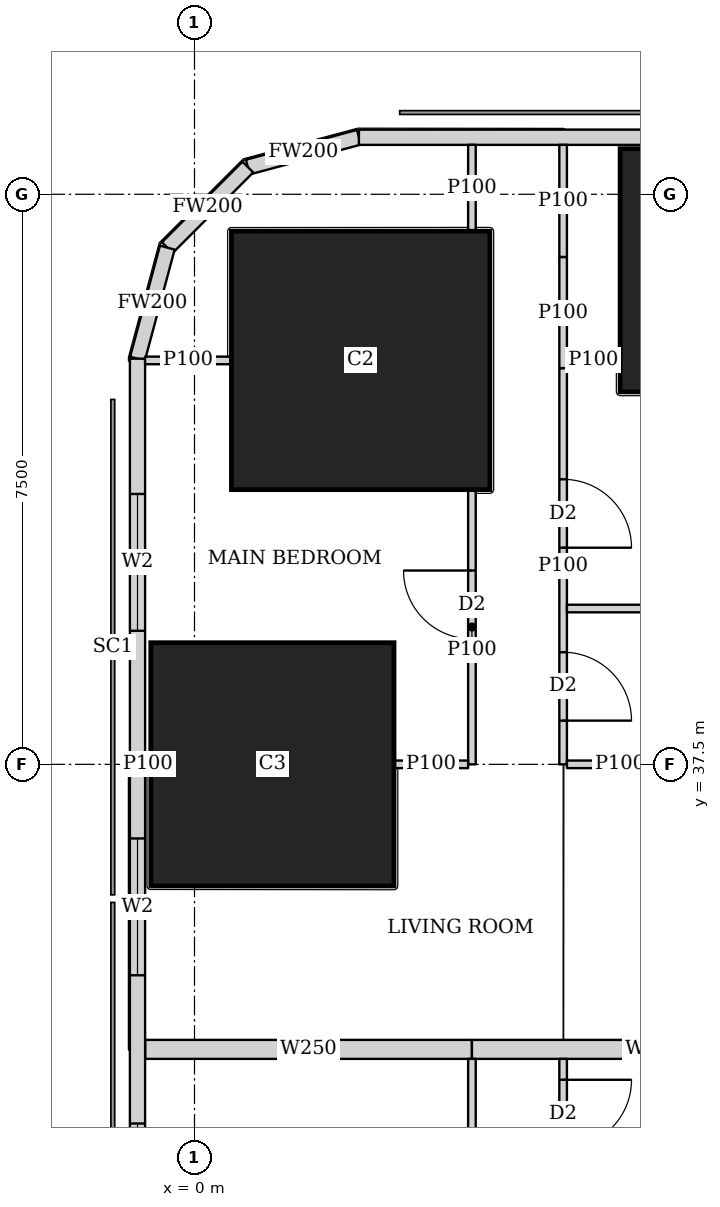
"""IFC4 building model, lengths in metres.
Left out: names, types, materials, properties, quantities, classifications, styles, units other than length and angle.
Written with IfcOpenShell. Run it as: python <this file> out.ifc"""

import sys

from ifc_helpers import new_model, si_unit, direction, frame, frame_2d, origin, origin_2d, place, context, subcontext, project, spatial, rectangle, extrude, element, fill, save


model = new_model("IFC4")
c1 = context("Model", 3, precision=1e-05, world=origin(), true_north=direction((0.0, 1.0)))
c2 = subcontext(c1, "Body", "Model", "MODEL_VIEW")
j1 = project(units=[si_unit("LENGTHUNIT", "METRE"), si_unit("PLANEANGLEUNIT", "RADIAN")], contexts=[c1])
p1 = place(None, origin())
s1 = spatial("IfcSite", under=j1, at=p1, CompositionType="ELEMENT")
p2 = place(p1, origin())
s2 = spatial("IfcBuilding", under=s1, at=p2, CompositionType="ELEMENT")
p3 = place(p2, frame((0.0, 0.0, 20.0)))
s3 = spatial("IfcBuildingStorey", under=s2, at=p3, CompositionType="ELEMENT", Elevation=20.0)
p4 = place(p3, frame((1.025, 37.5, -0.3), z_axis=(0.0, 0.0, 1.0), x_axis=(1.0, 0.0, 0.0)))
e1 = element("IfcColumn", 1, at=p4, inside=s3, PredefinedType="COLUMN", context=c2, shape_type="SweptSolid", body=[
    extrude(rectangle(XDim=3.2, YDim=3.2, at=origin_2d()), origin(), (0.0, 0.0, 1.0), 4.05),
])
p5 = place(p3, frame((2.186, 42.814, 0.0), z_axis=(0.0, 0.0, 1.0), x_axis=(1.0, 0.0, 0.0)))
e2 = element("IfcColumn", 2, at=p5, inside=s3, PredefinedType="COLUMN", context=c2, shape_type="SweptSolid", body=[
    extrude(rectangle(XDim=3.4, YDim=3.4, at=origin_2d()), origin(), (0.0, 0.0, 1.0), 3.75),
])
p6 = place(p3, frame((7.2, 44.0, -0.3), z_axis=(0.0, 0.0, 1.0), x_axis=(1.0, 0.0, 0.0)))
e3 = element("IfcColumn", 3, at=p6, inside=s3, PredefinedType="COLUMN", context=c2, shape_type="SweptSolid", body=[
    extrude(rectangle(XDim=3.2, YDim=3.2, at=origin_2d()), origin(), (0.0, 0.0, 1.0), 4.05),
])
p7 = place(p3, frame((40.106, 45.75, 0.0), z_axis=(0.0, 0.0, 1.0), x_axis=(-1.0, 0.0, 0.0)))
e4 = element("IfcWall", 4, at=p7, inside=s3, PredefinedType="SOLIDWALL", context=c2, shape_type="SweptSolid", body=[
    extrude(rectangle(XDim=37.943, YDim=0.2, at=frame_2d((18.971, 0.0))), origin(), (0.0, 0.0, 1.0), 3.5),
])
p8 = place(p7, frame((8.606, 0.0, 0.9)))
e5 = element("IfcOpeningElement", 5, at=p8, cuts=e4, PredefinedType="OPENING", context=c2, shape_type="SweptSolid", body=[
    extrude(rectangle(XDim=1.8, YDim=1.5, at=frame_2d((0.9, 0.75))), frame((0.0, 0.11, 0.0), z_axis=(0.0, -1.0, 0.0), x_axis=(1.0, 0.0, 0.0)), (0.0, 0.0, 1.0), 0.22),
])
p9 = place(p7, frame((12.206, 0.0, 0.9)))
e6 = element("IfcOpeningElement", 6, at=p9, cuts=e4, PredefinedType="OPENING", context=c2, shape_type="SweptSolid", body=[
    extrude(rectangle(XDim=1.8, YDim=1.5, at=frame_2d((0.9, 0.75))), frame((0.0, 0.11, 0.0), z_axis=(0.0, -1.0, 0.0), x_axis=(1.0, 0.0, 0.0)), (0.0, 0.0, 1.0), 0.22),
])
p10 = place(p7, frame((15.806, 0.0, 0.9)))
e7 = element("IfcOpeningElement", 7, at=p10, cuts=e4, PredefinedType="OPENING", context=c2, shape_type="SweptSolid", body=[
    extrude(rectangle(XDim=1.8, YDim=1.5, at=frame_2d((0.9, 0.75))), frame((0.0, 0.11, 0.0), z_axis=(0.0, -1.0, 0.0), x_axis=(1.0, 0.0, 0.0)), (0.0, 0.0, 1.0), 0.22),
])
p11 = place(p7, frame((19.406, 0.0, 0.9)))
e8 = element("IfcOpeningElement", 8, at=p11, cuts=e4, PredefinedType="OPENING", context=c2, shape_type="SweptSolid", body=[
    extrude(rectangle(XDim=1.8, YDim=1.5, at=frame_2d((0.9, 0.75))), frame((0.0, 0.11, 0.0), z_axis=(0.0, -1.0, 0.0), x_axis=(1.0, 0.0, 0.0)), (0.0, 0.0, 1.0), 0.22),
])
p12 = place(p7, frame((23.006, 0.0, 0.9)))
e9 = element("IfcOpeningElement", 9, at=p12, cuts=e4, PredefinedType="OPENING", context=c2, shape_type="SweptSolid", body=[
    extrude(rectangle(XDim=1.8, YDim=1.5, at=frame_2d((0.9, 0.75))), frame((0.0, 0.11, 0.0), z_axis=(0.0, -1.0, 0.0), x_axis=(1.0, 0.0, 0.0)), (0.0, 0.0, 1.0), 0.22),
])
p13 = place(p7, frame((26.606, 0.0, 0.9)))
e10 = element("IfcOpeningElement", 10, at=p13, cuts=e4, PredefinedType="OPENING", context=c2, shape_type="SweptSolid", body=[
    extrude(rectangle(XDim=1.8, YDim=1.5, at=frame_2d((0.9, 0.75))), frame((0.0, 0.11, 0.0), z_axis=(0.0, -1.0, 0.0), x_axis=(1.0, 0.0, 0.0)), (0.0, 0.0, 1.0), 0.22),
])
p14 = place(p3, frame((2.163, 45.75, 0.0), z_axis=(0.0, 0.0, 1.0), x_axis=(-0.965832000415, -0.259168954497, 0.0)))
e11 = element("IfcWall", 11, at=p14, inside=s3, PredefinedType="SOLIDWALL", context=c2, shape_type="SweptSolid", body=[
    extrude(rectangle(XDim=1.513, YDim=0.2, at=frame_2d((0.756, 0.0))), origin(), (0.0, 0.0, 1.0), 3.5),
])
p15 = place(p3, frame((0.702, 45.358, 0.0), z_axis=(0.0, 0.0, 1.0), x_axis=(-0.707106781187, -0.707106781187, 0.0)))
e12 = element("IfcWall", 12, at=p15, inside=s3, PredefinedType="SOLIDWALL", context=c2, shape_type="SweptSolid", body=[
    extrude(rectangle(XDim=1.499, YDim=0.2, at=frame_2d((0.75, 0.0))), origin(), (0.0, 0.0, 1.0), 3.5),
])
p16 = place(p3, frame((-0.358, 44.298, 0.0), z_axis=(0.0, 0.0, 1.0), x_axis=(-0.259168954497, -0.965832000415, 0.0)))
e13 = element("IfcWall", 13, at=p16, inside=s3, PredefinedType="SOLIDWALL", context=c2, shape_type="SweptSolid", body=[
    extrude(rectangle(XDim=1.513, YDim=0.2, at=frame_2d((0.756, 0.0))), origin(), (0.0, 0.0, 1.0), 3.5),
])
p17 = place(p3, frame((-0.75, 42.837, 0.0), z_axis=(0.0, 0.0, 1.0), x_axis=(0.0, -1.0, 0.0)))
e14 = element("IfcWall", 14, at=p17, inside=s3, PredefinedType="SOLIDWALL", context=c2, shape_type="SweptSolid", body=[
    extrude(rectangle(XDim=40.674, YDim=0.2, at=frame_2d((20.337, 0.0))), origin(), (0.0, 0.0, 1.0), 3.5),
])
p18 = place(p17, frame((1.78, 0.0, 0.9)))
e15 = element("IfcOpeningElement", 15, at=p18, cuts=e14, PredefinedType="OPENING", context=c2, shape_type="SweptSolid", body=[
    extrude(rectangle(XDim=1.8, YDim=1.5, at=frame_2d((0.9, 0.75))), frame((0.0, 0.11, 0.0), z_axis=(0.0, -1.0, 0.0), x_axis=(1.0, 0.0, 0.0)), (0.0, 0.0, 1.0), 0.22),
])
p19 = place(p17, frame((6.312, 0.0, 0.9)))
e16 = element("IfcOpeningElement", 16, at=p19, cuts=e14, PredefinedType="OPENING", context=c2, shape_type="SweptSolid", body=[
    extrude(rectangle(XDim=1.8, YDim=1.5, at=frame_2d((0.9, 0.75))), frame((0.0, 0.11, 0.0), z_axis=(0.0, -1.0, 0.0), x_axis=(1.0, 0.0, 0.0)), (0.0, 0.0, 1.0), 0.22),
])
p20 = place(p17, frame((10.062, 0.0, 0.9)))
e17 = element("IfcOpeningElement", 17, at=p20, cuts=e14, PredefinedType="OPENING", context=c2, shape_type="SweptSolid", body=[
    extrude(rectangle(XDim=1.8, YDim=1.5, at=frame_2d((0.9, 0.75))), frame((0.0, 0.11, 0.0), z_axis=(0.0, -1.0, 0.0), x_axis=(1.0, 0.0, 0.0)), (0.0, 0.0, 1.0), 0.22),
])
p21 = place(p17, frame((13.812, 0.0, 0.9)))
e18 = element("IfcOpeningElement", 18, at=p21, cuts=e14, PredefinedType="OPENING", context=c2, shape_type="SweptSolid", body=[
    extrude(rectangle(XDim=1.8, YDim=1.5, at=frame_2d((0.9, 0.75))), frame((0.0, 0.11, 0.0), z_axis=(0.0, -1.0, 0.0), x_axis=(1.0, 0.0, 0.0)), (0.0, 0.0, 1.0), 0.22),
])
p22 = place(p17, frame((17.562, 0.0, 0.9)))
e19 = element("IfcOpeningElement", 19, at=p22, cuts=e14, PredefinedType="OPENING", context=c2, shape_type="SweptSolid", body=[
    extrude(rectangle(XDim=1.8, YDim=1.5, at=frame_2d((0.9, 0.75))), frame((0.0, 0.11, 0.0), z_axis=(0.0, -1.0, 0.0), x_axis=(1.0, 0.0, 0.0)), (0.0, 0.0, 1.0), 0.22),
])
p23 = place(p17, frame((21.312, 0.0, 0.9)))
e20 = element("IfcOpeningElement", 20, at=p23, cuts=e14, PredefinedType="OPENING", context=c2, shape_type="SweptSolid", body=[
    extrude(rectangle(XDim=1.8, YDim=1.5, at=frame_2d((0.9, 0.75))), frame((0.0, 0.11, 0.0), z_axis=(0.0, -1.0, 0.0), x_axis=(1.0, 0.0, 0.0)), (0.0, 0.0, 1.0), 0.22),
])
p24 = place(p17, frame((25.062, 0.0, 0.9)))
e21 = element("IfcOpeningElement", 21, at=p24, cuts=e14, PredefinedType="OPENING", context=c2, shape_type="SweptSolid", body=[
    extrude(rectangle(XDim=1.8, YDim=1.5, at=frame_2d((0.9, 0.75))), frame((0.0, 0.11, 0.0), z_axis=(0.0, -1.0, 0.0), x_axis=(1.0, 0.0, 0.0)), (0.0, 0.0, 1.0), 0.22),
])
p25 = place(p17, frame((28.812, 0.0, 0.9)))
e22 = element("IfcOpeningElement", 22, at=p25, cuts=e14, PredefinedType="OPENING", context=c2, shape_type="SweptSolid", body=[
    extrude(rectangle(XDim=1.8, YDim=1.5, at=frame_2d((0.9, 0.75))), frame((0.0, 0.11, 0.0), z_axis=(0.0, -1.0, 0.0), x_axis=(1.0, 0.0, 0.0)), (0.0, 0.0, 1.0), 0.22),
])
p26 = place(p17, frame((32.562, 0.0, 0.9)))
e23 = element("IfcOpeningElement", 23, at=p26, cuts=e14, PredefinedType="OPENING", context=c2, shape_type="SweptSolid", body=[
    extrude(rectangle(XDim=1.8, YDim=1.5, at=frame_2d((0.9, 0.75))), frame((0.0, 0.11, 0.0), z_axis=(0.0, -1.0, 0.0), x_axis=(1.0, 0.0, 0.0)), (0.0, 0.0, 1.0), 0.22),
])
p27 = place(p17, frame((37.094, 0.0, 0.9)))
e24 = element("IfcOpeningElement", 24, at=p27, cuts=e14, PredefinedType="OPENING", context=c2, shape_type="SweptSolid", body=[
    extrude(rectangle(XDim=1.8, YDim=1.5, at=frame_2d((0.9, 0.75))), frame((0.0, 0.11, 0.0), z_axis=(0.0, -1.0, 0.0), x_axis=(1.0, 0.0, 0.0)), (0.0, 0.0, 1.0), 0.22),
])
p28 = place(p3, frame((3.65, 30.0, 0.0), z_axis=(0.0, 0.0, 1.0), x_axis=(0.0, 1.0, 0.0)))
e25 = element("IfcWall", 25, at=p28, inside=s3, PredefinedType="PARTITIONING", context=c2, shape_type="SweptSolid", body=[
    extrude(rectangle(XDim=3.625, YDim=0.1, at=frame_2d((1.812, 0.0))), origin(), (0.0, 0.0, 1.0), 3.5),
])
p29 = place(p28, frame((1.65, 0.0, 0.0)))
e26 = element("IfcOpeningElement", 26, at=p29, cuts=e25, PredefinedType="OPENING", context=c2, shape_type="SweptSolid", body=[
    extrude(rectangle(XDim=0.9, YDim=2.1, at=frame_2d((0.45, 1.05))), frame((0.0, 0.06, 0.0), z_axis=(0.0, -1.0, 0.0), x_axis=(1.0, 0.0, 0.0)), (0.0, 0.0, 1.0), 0.12),
])
p30 = place(p3, frame((4.85, 30.0, 0.0), z_axis=(0.0, 0.0, 1.0), x_axis=(0.0, 1.0, 0.0)))
e27 = element("IfcWall", 27, at=p30, inside=s3, PredefinedType="PARTITIONING", context=c2, shape_type="SweptSolid", body=[
    extrude(rectangle(XDim=3.625, YDim=0.1, at=frame_2d((1.812, 0.0))), origin(), (0.0, 0.0, 1.0), 3.5),
])
p31 = place(p30, frame((0.575, 0.0, 0.0)))
e28 = element("IfcOpeningElement", 28, at=p31, cuts=e27, PredefinedType="OPENING", context=c2, shape_type="SweptSolid", body=[
    extrude(rectangle(XDim=0.9, YDim=2.1, at=frame_2d((0.45, 1.05))), frame((0.0, 0.06, 0.0), z_axis=(0.0, -1.0, 0.0), x_axis=(1.0, 0.0, 0.0)), (0.0, 0.0, 1.0), 0.12),
])
p32 = place(p30, frame((2.45, 0.0, 0.0)))
e29 = element("IfcOpeningElement", 29, at=p32, cuts=e27, PredefinedType="OPENING", context=c2, shape_type="SweptSolid", body=[
    extrude(rectangle(XDim=0.9, YDim=2.1, at=frame_2d((0.45, 1.05))), frame((0.0, 0.06, 0.0), z_axis=(0.0, -1.0, 0.0), x_axis=(1.0, 0.0, 0.0)), (0.0, 0.0, 1.0), 0.12),
])
p33 = place(p3, frame((3.65, 37.5, 0.0), z_axis=(0.0, 0.0, 1.0), x_axis=(0.0, 1.0, 0.0)))
e30 = element("IfcWall", 30, at=p33, inside=s3, PredefinedType="PARTITIONING", context=c2, shape_type="SweptSolid", body=[
    extrude(rectangle(XDim=3.613, YDim=0.1, at=frame_2d((1.807, 0.0))), origin(), (0.0, 0.0, 1.0), 3.5),
])
p34 = place(p33, frame((1.65, 0.0, 0.0)))
e31 = element("IfcOpeningElement", 31, at=p34, cuts=e30, PredefinedType="OPENING", context=c2, shape_type="SweptSolid", body=[
    extrude(rectangle(XDim=0.9, YDim=2.1, at=frame_2d((0.45, 1.05))), frame((0.0, 0.06, 0.0), z_axis=(0.0, -1.0, 0.0), x_axis=(1.0, 0.0, 0.0)), (0.0, 0.0, 1.0), 0.12),
])
p35 = place(p3, frame((3.65, 44.515, 0.0), z_axis=(0.0, 0.0, 1.0), x_axis=(0.0, 1.0, 0.0)))
e32 = element("IfcWall", 32, at=p35, inside=s3, PredefinedType="PARTITIONING", context=c2, shape_type="SweptSolid", body=[
    extrude(rectangle(XDim=1.135, YDim=0.1, at=frame_2d((0.567, 0.0))), origin(), (0.0, 0.0, 1.0), 3.5),
])
p36 = place(p3, frame((4.85, 37.5, 0.0), z_axis=(0.0, 0.0, 1.0), x_axis=(0.0, 1.0, 0.0)))
e33 = element("IfcWall", 33, at=p36, inside=s3, PredefinedType="PARTITIONING", context=c2, shape_type="SweptSolid", body=[
    extrude(rectangle(XDim=5.213, YDim=0.1, at=frame_2d((2.606, 0.0))), origin(), (0.0, 0.0, 1.0), 3.5),
])
p37 = place(p36, frame((0.575, 0.0, 0.0)))
e34 = element("IfcOpeningElement", 34, at=p37, cuts=e33, PredefinedType="OPENING", context=c2, shape_type="SweptSolid", body=[
    extrude(rectangle(XDim=0.9, YDim=2.1, at=frame_2d((0.45, 1.05))), frame((0.0, 0.06, 0.0), z_axis=(0.0, -1.0, 0.0), x_axis=(1.0, 0.0, 0.0)), (0.0, 0.0, 1.0), 0.12),
])
p38 = place(p36, frame((2.85, 0.0, 0.0)))
e35 = element("IfcOpeningElement", 35, at=p38, cuts=e33, PredefinedType="OPENING", context=c2, shape_type="SweptSolid", body=[
    extrude(rectangle(XDim=0.9, YDim=2.1, at=frame_2d((0.45, 1.05))), frame((0.0, 0.06, 0.0), z_axis=(0.0, -1.0, 0.0), x_axis=(1.0, 0.0, 0.0)), (0.0, 0.0, 1.0), 0.12),
])
p39 = place(p3, frame((4.85, 42.713, 0.0), z_axis=(0.0, 0.0, 1.0), x_axis=(0.0, 1.0, 0.0)))
e36 = element("IfcWall", 36, at=p39, inside=s3, PredefinedType="PARTITIONING", context=c2, shape_type="SweptSolid", body=[
    extrude(rectangle(XDim=1.462, YDim=0.1, at=frame_2d((0.731, 0.0))), origin(), (0.0, 0.0, 1.0), 2.1),
])
p40 = place(p3, frame((4.85, 44.175, 0.0), z_axis=(0.0, 0.0, 1.0), x_axis=(0.0, 1.0, 0.0)))
e37 = element("IfcWall", 37, at=p40, inside=s3, PredefinedType="PARTITIONING", context=c2, shape_type="SweptSolid", body=[
    extrude(rectangle(XDim=1.475, YDim=0.1, at=frame_2d((0.737, 0.0))), origin(), (0.0, 0.0, 1.0), 3.5),
])
p41 = place(p3, frame((-0.65, 37.5, 0.0), z_axis=(0.0, 0.0, 1.0), x_axis=(1.0, 0.0, 0.0)))
e38 = element("IfcWall", 38, at=p41, inside=s3, PredefinedType="PARTITIONING", context=c2, shape_type="SweptSolid", body=[
    extrude(rectangle(XDim=0.074, YDim=0.1, at=frame_2d((0.037, 0.0))), origin(), (0.0, 0.0, 1.0), 3.5),
])
p42 = place(p3, frame((2.626, 37.5, 0.0), z_axis=(0.0, 0.0, 1.0), x_axis=(1.0, 0.0, 0.0)))
e39 = element("IfcWall", 39, at=p42, inside=s3, PredefinedType="PARTITIONING", context=c2, shape_type="SweptSolid", body=[
    extrude(rectangle(XDim=0.974, YDim=0.1, at=frame_2d((0.487, 0.0))), origin(), (0.0, 0.0, 1.0), 3.5),
])
p43 = place(p3, frame((-0.65, 42.814, 0.0), z_axis=(0.0, 0.0, 1.0), x_axis=(1.0, 0.0, 0.0)))
e40 = element("IfcWall", 40, at=p43, inside=s3, PredefinedType="PARTITIONING", context=c2, shape_type="SweptSolid", body=[
    extrude(rectangle(XDim=1.135, YDim=0.1, at=frame_2d((0.567, 0.0))), origin(), (0.0, 0.0, 1.0), 3.5),
])
p44 = place(p3, frame((4.9, 37.5, 0.0), z_axis=(0.0, 0.0, 1.0), x_axis=(1.0, 0.0, 0.0)))
e41 = element("IfcWall", 41, at=p44, inside=s3, PredefinedType="PARTITIONING", context=c2, shape_type="SweptSolid", body=[
    extrude(rectangle(XDim=1.399, YDim=0.1, at=frame_2d((0.7, 0.0))), origin(), (0.0, 0.0, 1.0), 3.5),
])
p45 = place(p3, frame((4.9, 42.814, 0.0), z_axis=(0.0, 0.0, 1.0), x_axis=(1.0, 0.0, 0.0)))
e42 = element("IfcWall", 42, at=p45, inside=s3, PredefinedType="PARTITIONING", context=c2, shape_type="SweptSolid", body=[
    extrude(rectangle(XDim=0.699, YDim=0.1, at=frame_2d((0.35, 0.0))), origin(), (0.0, 0.0, 1.0), 2.1),
])
p46 = place(p3, frame((4.9, 39.55, 0.0), z_axis=(0.0, 0.0, 1.0), x_axis=(1.0, 0.0, 0.0)))
e43 = element("IfcWall", 43, at=p46, inside=s3, PredefinedType="PARTITIONING", context=c2, shape_type="SweptSolid", body=[
    extrude(rectangle(XDim=3.525, YDim=0.1, at=frame_2d((1.763, 0.0))), origin(), (0.0, 0.0, 1.0), 3.5),
])
p47 = place(p3, frame((-0.65, 33.75, 0.0), z_axis=(0.0, 0.0, 1.0), x_axis=(1.0, 0.0, 0.0)))
e44 = element("IfcWall", 44, at=p47, inside=s3, PredefinedType="SOLIDWALL", context=c2, shape_type="SweptSolid", body=[
    extrude(rectangle(XDim=4.3, YDim=0.25, at=frame_2d((2.15, 0.0))), origin(), (0.0, 0.0, 1.0), 2.05),
])
p48 = place(p3, frame((3.65, 33.75, 0.0), z_axis=(0.0, 0.0, 1.0), x_axis=(1.0, 0.0, 0.0)))
e45 = element("IfcWall", 45, at=p48, inside=s3, PredefinedType="SOLIDWALL", context=c2, shape_type="SweptSolid", body=[
    extrude(rectangle(XDim=4.775, YDim=0.25, at=frame_2d((2.388, 0.0))), origin(), (0.0, 0.0, 1.0), 3.5),
])
p49 = place(p18, origin())
e46 = element("IfcWindow", 46, at=p49, inside=s3, PartitioningType="SINGLE_PANEL", PredefinedType="WINDOW", context=c2, shape_type="SweptSolid", body=[
    extrude(rectangle(XDim=1.8, YDim=1.5, at=frame_2d((0.9, 0.75))), frame((0.0, 0.03, 0.0), z_axis=(0.0, -1.0, 0.0), x_axis=(1.0, 0.0, 0.0)), (0.0, 0.0, 1.0), 0.06),
])
fill(e15, e46)
p50 = place(p19, origin())
e47 = element("IfcWindow", 47, at=p50, inside=s3, PartitioningType="SINGLE_PANEL", PredefinedType="WINDOW", context=c2, shape_type="SweptSolid", body=[
    extrude(rectangle(XDim=1.8, YDim=1.5, at=frame_2d((0.9, 0.75))), frame((0.0, 0.03, 0.0), z_axis=(0.0, -1.0, 0.0), x_axis=(1.0, 0.0, 0.0)), (0.0, 0.0, 1.0), 0.06),
])
fill(e16, e47)
p51 = place(p20, origin())
e48 = element("IfcWindow", 48, at=p51, inside=s3, PartitioningType="SINGLE_PANEL", PredefinedType="WINDOW", context=c2, shape_type="SweptSolid", body=[
    extrude(rectangle(XDim=1.8, YDim=1.5, at=frame_2d((0.9, 0.75))), frame((0.0, 0.03, 0.0), z_axis=(0.0, -1.0, 0.0), x_axis=(1.0, 0.0, 0.0)), (0.0, 0.0, 1.0), 0.06),
])
fill(e17, e48)
p52 = place(p32, origin())
e49 = element("IfcDoor", 49, at=p52, inside=s3, OperationType="SINGLE_SWING_LEFT", PredefinedType="DOOR", context=c2, shape_type="SweptSolid", body=[
    extrude(rectangle(XDim=0.9, YDim=2.1, at=frame_2d((0.45, 1.05))), frame((0.0, 0.025, 0.0), z_axis=(0.0, -1.0, 0.0), x_axis=(1.0, 0.0, 0.0)), (0.0, 0.0, 1.0), 0.05),
])
fill(e29, e49)
p53 = place(p34, origin())
e50 = element("IfcDoor", 50, at=p53, inside=s3, OperationType="SINGLE_SWING_RIGHT", PredefinedType="DOOR", context=c2, shape_type="SweptSolid", body=[
    extrude(rectangle(XDim=0.9, YDim=2.1, at=frame_2d((0.45, 1.05))), frame((0.0, 0.025, 0.0), z_axis=(0.0, -1.0, 0.0), x_axis=(1.0, 0.0, 0.0)), (0.0, 0.0, 1.0), 0.05),
])
fill(e31, e50)
p54 = place(p37, origin())
e51 = element("IfcDoor", 51, at=p54, inside=s3, OperationType="SINGLE_SWING_RIGHT", PredefinedType="DOOR", context=c2, shape_type="SweptSolid", body=[
    extrude(rectangle(XDim=0.9, YDim=2.1, at=frame_2d((0.45, 1.05))), frame((0.0, 0.025, 0.0), z_axis=(0.0, -1.0, 0.0), x_axis=(1.0, 0.0, 0.0)), (0.0, 0.0, 1.0), 0.05),
])
fill(e34, e51)
p55 = place(p38, origin())
e52 = element("IfcDoor", 52, at=p55, inside=s3, OperationType="SINGLE_SWING_RIGHT", PredefinedType="DOOR", context=c2, shape_type="SweptSolid", body=[
    extrude(rectangle(XDim=0.9, YDim=2.1, at=frame_2d((0.45, 1.05))), frame((0.0, 0.025, 0.0), z_axis=(0.0, -1.0, 0.0), x_axis=(1.0, 0.0, 0.0)), (0.0, 0.0, 1.0), 0.05),
])
fill(e35, e52)
save(model, sys.argv[1])
